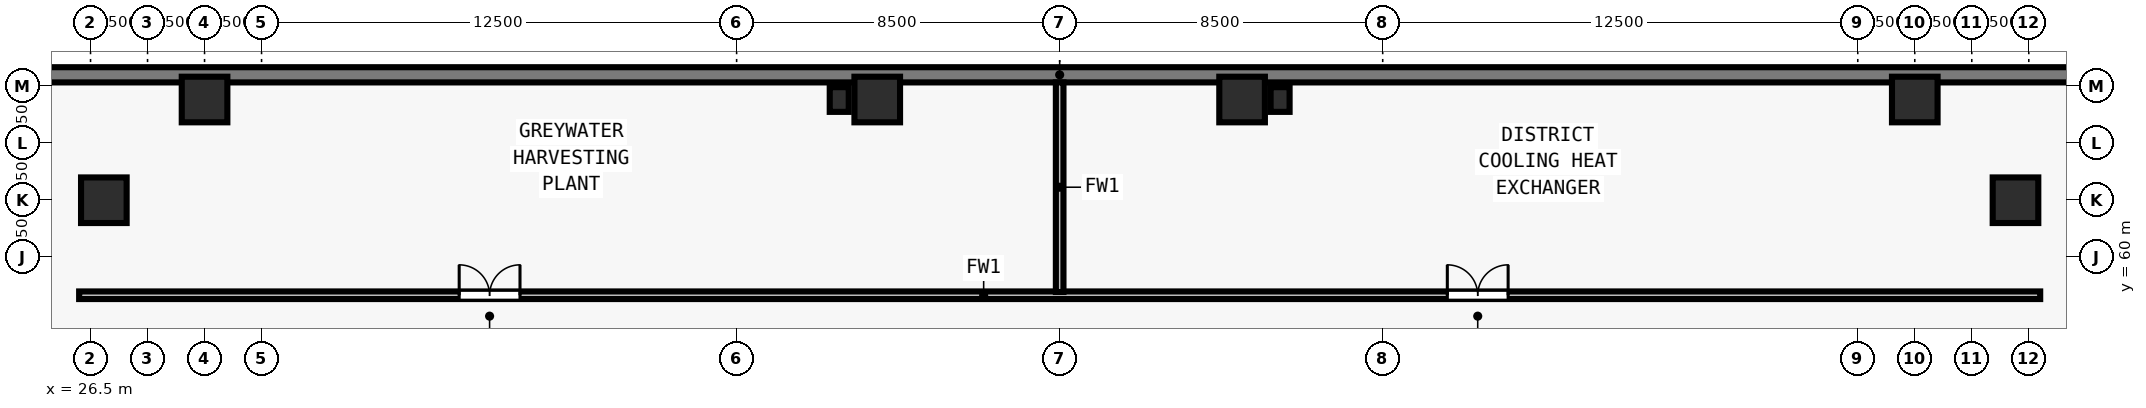
"""IFC4 building model, lengths in metres.
Left out: names, types, materials, properties, quantities, classifications, styles, units other than length and angle.
Written with IfcOpenShell. Run it as: python <this file> out.ifc"""

import sys

from ifc_helpers import new_model, si_unit, direction, frame, frame_2d, origin, origin_2d, place, context, subcontext, project, spatial, rectangle, extrude, element, fill, save


model = new_model("IFC4")
c1 = context("Model", 3, precision=1e-05, world=origin(), true_north=direction((0.0, 1.0)))
c2 = subcontext(c1, "Body", "Model", "MODEL_VIEW")
j1 = project(units=[si_unit("LENGTHUNIT", "METRE"), si_unit("PLANEANGLEUNIT", "RADIAN")], contexts=[c1])
p1 = place(None, origin())
s1 = spatial("IfcSite", under=j1, at=p1, CompositionType="ELEMENT")
p2 = place(p1, origin())
s2 = spatial("IfcBuilding", under=s1, at=p2, CompositionType="ELEMENT")
p3 = place(p2, frame((0.0, 0.0, -8.0)))
s3 = spatial("IfcBuildingStorey", under=s2, at=p3, CompositionType="ELEMENT", Elevation=-8.0)
for number, where, z_axis, x_axis in (
    (1, (77.15, 61.5, 0.0), (0.0, 0.0, 1.0), (1.0, 0.0, 0.0)),
    (2, (74.5, 64.15, 0.0), (0.0, 0.0, 1.0), (1.0, 0.0, 0.0)),
    (3, (56.8, 64.15, 0.0), (0.0, 0.0, 1.0), (1.0, 0.0, 0.0)),
    (4, (47.2, 64.15, 0.0), (0.0, 0.0, 1.0), (1.0, 0.0, 0.0)),
    (5, (29.5, 64.15, 0.0), (0.0, 0.0, 1.0), (1.0, 0.0, 0.0)),
    (6, (26.85, 61.5, 0.0), (0.0, 0.0, 1.0), (1.0, 0.0, 0.0)),
):
    element("IfcColumn", number, at=place(p3, frame(where, z_axis=z_axis, x_axis=x_axis)), inside=s3, PredefinedType="COLUMN", context=c2, shape_type="SweptSolid", body=[
        extrude(rectangle(XDim=1.2, YDim=1.2, at=origin_2d()), origin(), (0.0, 0.0, 1.0), 4.0),
    ])
for number, where, z_axis, x_axis in (
    (7, (46.2, 64.15, 0.0), (0.0, 0.0, 1.0), (1.0, 0.0, 0.0)),
    (8, (57.8, 64.15, 0.0), (0.0, 0.0, 1.0), (1.0, 0.0, 0.0)),
):
    element("IfcColumn", number, at=place(p3, frame(where, z_axis=z_axis, x_axis=x_axis)), inside=s3, PredefinedType="PILASTER", context=c2, shape_type="SweptSolid", body=[
        extrude(rectangle(XDim=0.5, YDim=0.65, at=origin_2d()), origin(), (0.0, 0.0, 1.0), 4.0),
    ])
p4 = place(p3, frame((19.0, 64.8, 0.0), z_axis=(0.0, 0.0, 1.0), x_axis=(1.0, 0.0, 0.0)))
e9 = element("IfcWall", 9, at=p4, inside=s3, PredefinedType="USERDEFINED", context=c2, shape_type="SweptSolid", body=[
    extrude(rectangle(XDim=66.0, YDim=0.4, at=frame_2d((33.0, 0.0))), origin(), (0.0, 0.0, 1.0), 3.72),
])
p5 = place(p3, frame((26.2, 59.0, 0.0), z_axis=(0.0, 0.0, 1.0), x_axis=(1.0, 0.0, 0.0)))
e10 = element("IfcWall", 10, at=p5, inside=s3, PredefinedType="SOLIDWALL", context=c2, shape_type="SweptSolid", body=[
    extrude(rectangle(XDim=51.6, YDim=0.2, at=frame_2d((25.8, 0.0))), origin(), (0.0, 0.0, 1.0), 3.238),
])
p6 = place(p5, frame((10.0, 0.0, 0.0)))
e11 = element("IfcOpeningElement", 11, at=p6, cuts=e10, PredefinedType="OPENING", context=c2, shape_type="SweptSolid", body=[
    extrude(rectangle(XDim=1.6, YDim=2.2, at=frame_2d((0.8, 1.1))), frame((0.0, 0.11, 0.0), z_axis=(0.0, -1.0, 0.0), x_axis=(1.0, 0.0, 0.0)), (0.0, 0.0, 1.0), 0.22),
])
p7 = place(p5, frame((36.0, 0.0, 0.0)))
e12 = element("IfcOpeningElement", 12, at=p7, cuts=e10, PredefinedType="OPENING", context=c2, shape_type="SweptSolid", body=[
    extrude(rectangle(XDim=1.6, YDim=2.2, at=frame_2d((0.8, 1.1))), frame((0.0, 0.11, 0.0), z_axis=(0.0, -1.0, 0.0), x_axis=(1.0, 0.0, 0.0)), (0.0, 0.0, 1.0), 0.22),
])
p8 = place(p3, frame((52.0, 59.085, 0.0), z_axis=(0.0, 0.0, 1.0), x_axis=(0.0, 1.0, 0.0)))
e13 = element("IfcWall", 13, at=p8, inside=s3, PredefinedType="SOLIDWALL", context=c2, shape_type="SweptSolid", body=[
    extrude(rectangle(XDim=5.515, YDim=0.2, at=frame_2d((2.758, 0.0))), origin(), (0.0, 0.0, 1.0), 3.72),
])
p9 = place(p6, origin())
e14 = element("IfcDoor", 14, at=p9, inside=s3, OperationType="DOUBLE_DOOR_SINGLE_SWING", PredefinedType="DOOR", context=c2, shape_type="SweptSolid", body=[
    extrude(rectangle(XDim=1.6, YDim=2.2, at=frame_2d((0.8, 1.1))), frame((0.0, 0.025, 0.0), z_axis=(0.0, -1.0, 0.0), x_axis=(1.0, 0.0, 0.0)), (0.0, 0.0, 1.0), 0.05),
])
fill(e11, e14)
p10 = place(p7, origin())
e15 = element("IfcDoor", 15, at=p10, inside=s3, OperationType="DOUBLE_DOOR_SINGLE_SWING", PredefinedType="DOOR", context=c2, shape_type="SweptSolid", body=[
    extrude(rectangle(XDim=1.6, YDim=2.2, at=frame_2d((0.8, 1.1))), frame((0.0, 0.025, 0.0), z_axis=(0.0, -1.0, 0.0), x_axis=(1.0, 0.0, 0.0)), (0.0, 0.0, 1.0), 0.05),
])
fill(e12, e15)
save(model, sys.argv[1])
